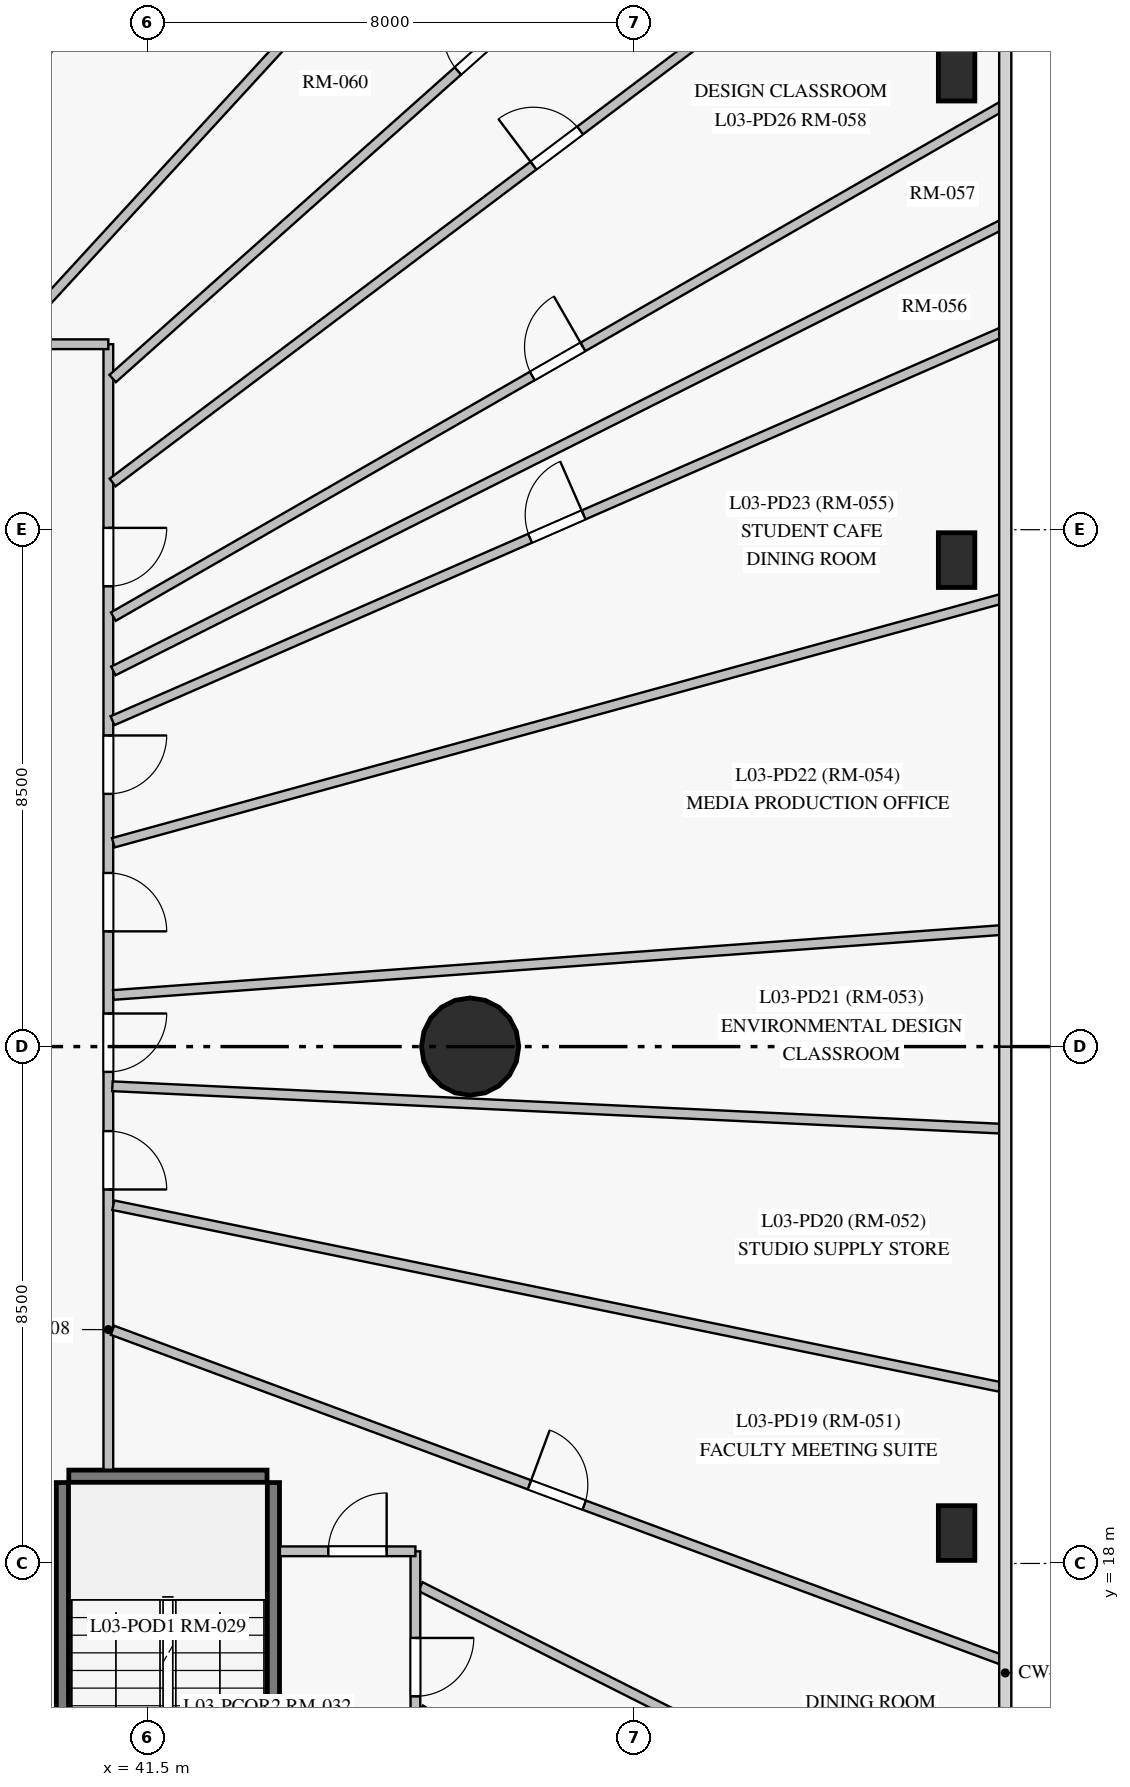
"""IFC4 building model, lengths in metres.
Left out: names, types, materials, properties, quantities, classifications, styles, units other than length and angle.
Written with IfcOpenShell. Run it as: python <this file> out.ifc"""

import sys

from ifc_helpers import new_model, si_unit, direction, frame, frame_2d, origin, origin_with_axes, origin_2d, place, context, subcontext, project, spatial, rectangle, circle, extrude, source, transform, mapped, element, fill, save


model = new_model("IFC4")
c1 = context("Model", 3, precision=1e-05, world=origin(), true_north=direction((0.0, 1.0)))
c2 = subcontext(c1, "Body", "Model", "MODEL_VIEW")
j1 = project(units=[si_unit("LENGTHUNIT", "METRE"), si_unit("PLANEANGLEUNIT", "RADIAN")], contexts=[c1])
p1 = place(None, origin())
s1 = spatial("IfcSite", under=j1, at=p1, CompositionType="ELEMENT")
p2 = place(p1, origin())
s2 = spatial("IfcBuilding", under=s1, at=p2, CompositionType="ELEMENT")
p3 = place(p2, frame((0.0, 0.0, 13.5)))
s3 = spatial("IfcBuildingStorey", under=s2, at=p3, CompositionType="ELEMENT", Elevation=13.5)
m1 = source(origin_with_axes(), c2, "Body", "SweptSolid", [
    extrude(circle(Radius=0.8, at=origin_2d()), origin(), (0.0, 0.0, 1.0), 4.5),
])
p4 = place(p3, frame((46.8, 26.5, 0.0), z_axis=(0.0, 0.0, 1.0), x_axis=(1.0, 0.0, 0.0)))
e1 = element("IfcColumn", 1, at=p4, inside=s3, PredefinedType="COLUMN", context=c2, shape_type="MappedRepresentation", body=[
    mapped(m1, transform((0.0, 0.0, 0.0), scale=1.0)),
])
m2 = source(origin_with_axes(), c2, "Body", "SweptSolid", [
    extrude(rectangle(XDim=0.6, YDim=0.9, at=origin_2d()), origin(), (0.0, 0.0, 1.0), 4.5),
])
for number, where, z_axis, x_axis in (
    (2, (54.8, 18.5, 0.0), (0.0, 0.0, 1.0), (1.0, 0.0, 0.0)),
    (3, (54.8, 34.5, 0.0), (0.0, 0.0, 1.0), (1.0, 0.0, 0.0)),
    (4, (54.8, 42.5, 0.0), (0.0, 0.0, 1.0), (1.0, 0.0, 0.0)),
):
    element("IfcColumn", number, at=place(p3, frame(where, z_axis=z_axis, x_axis=x_axis)), inside=s3, PredefinedType="PILASTER", context=c2, shape_type="MappedRepresentation", body=[
        mapped(m2, transform((0.0, 0.0, 0.0), scale=1.0)),
    ])
p5 = place(p3, frame((40.095, 11.98, 0.0), z_axis=(0.0, 0.0, 1.0), x_axis=(0.0, 1.0, 0.0)))
e5 = element("IfcWall", 5, at=p5, inside=s3, PredefinedType="SHEAR", context=c2, shape_type="SweptSolid", body=[
    extrude(rectangle(XDim=7.35, YDim=0.2, at=frame_2d((3.675, 0.0))), origin(), (0.0, 0.0, 1.0), 4.225),
])
p6 = place(p3, frame((43.565, 11.98, 0.0), z_axis=(0.0, 0.0, 1.0), x_axis=(0.0, 1.0, 0.0)))
e6 = element("IfcWall", 6, at=p6, inside=s3, PredefinedType="SHEAR", context=c2, shape_type="SweptSolid", body=[
    extrude(rectangle(XDim=7.35, YDim=0.2, at=frame_2d((3.675, 0.0))), origin(), (0.0, 0.0, 1.0), 4.225),
])
p7 = place(p6, frame((0.35, 0.0, 0.0)))
e7 = element("IfcOpeningElement", 7, at=p7, cuts=e6, PredefinedType="OPENING", context=c2, shape_type="SweptSolid", body=[
    extrude(rectangle(XDim=1.15, YDim=2.15, at=frame_2d((0.575, 1.075))), frame((0.0, 0.11, 0.0), z_axis=(0.0, -1.0, 0.0), x_axis=(1.0, 0.0, 0.0)), (0.0, 0.0, 1.0), 0.22),
])
p8 = place(p3, frame((40.2, 19.435, 0.0), z_axis=(0.0, 0.0, 1.0), x_axis=(1.0, 0.0, 0.0)))
e8 = element("IfcWall", 8, at=p8, inside=s3, PredefinedType="SHEAR", context=c2, shape_type="SweptSolid", body=[
    extrude(rectangle(XDim=3.26, YDim=0.2, at=frame_2d((1.63, 0.0))), origin(), (0.0, 0.0, 1.0), 4.225),
])
p9 = place(p3, frame((40.85, 38.05, 0.0), z_axis=(0.0, 0.0, 1.0), x_axis=(0.0, -1.0, 0.0)))
e9 = element("IfcWall", 9, at=p9, inside=s3, PredefinedType="PARTITIONING", context=c2, shape_type="SweptSolid", body=[
    extrude(rectangle(XDim=18.508, YDim=0.16, at=frame_2d((9.254, 0.0))), origin(), (0.0, 0.0, 1.0), 3.275),
])
p10 = place(p9, frame((12.94, 0.0, 0.0)))
e10 = element("IfcOpeningElement", 10, at=p10, cuts=e9, PredefinedType="OPENING", context=c2, shape_type="SweptSolid", body=[
    extrude(rectangle(XDim=0.96, YDim=2.15, at=frame_2d((0.48, 1.075))), frame((0.0, 0.09, 0.0), z_axis=(0.0, -1.0, 0.0), x_axis=(1.0, 0.0, 0.0)), (0.0, 0.0, 1.0), 0.18),
])
p11 = place(p9, frame((11.006, 0.0, 0.0)))
e11 = element("IfcOpeningElement", 11, at=p11, cuts=e9, PredefinedType="OPENING", context=c2, shape_type="SweptSolid", body=[
    extrude(rectangle(XDim=0.96, YDim=2.15, at=frame_2d((0.48, 1.075))), frame((0.0, 0.09, 0.0), z_axis=(0.0, -1.0, 0.0), x_axis=(1.0, 0.0, 0.0)), (0.0, 0.0, 1.0), 0.18),
])
p12 = place(p9, frame((8.695, 0.0, 0.0)))
e12 = element("IfcOpeningElement", 12, at=p12, cuts=e9, PredefinedType="OPENING", context=c2, shape_type="SweptSolid", body=[
    extrude(rectangle(XDim=0.96, YDim=2.15, at=frame_2d((0.48, 1.075))), frame((0.0, 0.09, 0.0), z_axis=(0.0, -1.0, 0.0), x_axis=(1.0, 0.0, 0.0)), (0.0, 0.0, 1.0), 0.18),
])
p13 = place(p9, frame((6.434, 0.0, 0.0)))
e13 = element("IfcOpeningElement", 13, at=p13, cuts=e9, PredefinedType="OPENING", context=c2, shape_type="SweptSolid", body=[
    extrude(rectangle(XDim=0.96, YDim=2.15, at=frame_2d((0.48, 1.075))), frame((0.0, 0.09, 0.0), z_axis=(0.0, -1.0, 0.0), x_axis=(1.0, 0.0, 0.0)), (0.0, 0.0, 1.0), 0.18),
])
p14 = place(p9, frame((3.02, 0.0, 0.0)))
e14 = element("IfcOpeningElement", 14, at=p14, cuts=e9, PredefinedType="OPENING", context=c2, shape_type="SweptSolid", body=[
    extrude(rectangle(XDim=0.96, YDim=2.15, at=frame_2d((0.48, 1.075))), frame((0.0, 0.09, 0.0), z_axis=(0.0, -1.0, 0.0), x_axis=(1.0, 0.0, 0.0)), (0.0, 0.0, 1.0), 0.18),
])
p15 = place(p3, frame((40.92, 35.776, 0.0), z_axis=(0.0, 0.0, 1.0), x_axis=(0.798876492125, 0.601495095848, 0.0)))
e15 = element("IfcWall", 15, at=p15, inside=s3, PredefinedType="PARTITIONING", context=c2, shape_type="SweptSolid", body=[
    extrude(rectangle(XDim=18.328, YDim=0.16, at=frame_2d((9.164, 0.0))), origin(), (0.0, 0.0, 1.0), 4.225),
])
p16 = place(p15, frame((8.664, 0.0, 0.0)))
e16 = element("IfcOpeningElement", 16, at=p16, cuts=e15, PredefinedType="OPENING", context=c2, shape_type="SweptSolid", body=[
    extrude(rectangle(XDim=0.96, YDim=2.15, at=frame_2d((0.48, 1.075))), frame((0.0, 0.09, 0.0), z_axis=(0.0, -1.0, 0.0), x_axis=(1.0, 0.0, 0.0)), (0.0, 0.0, 1.0), 0.18),
])
p17 = place(p3, frame((40.932, 33.571, 0.0), z_axis=(0.0, 0.0, 1.0), x_axis=(0.867157652111, 0.498033740207, 0.0)))
e17 = element("IfcWall", 17, at=p17, inside=s3, PredefinedType="PARTITIONING", context=c2, shape_type="SweptSolid", body=[
    extrude(rectangle(XDim=16.876, YDim=0.16, at=frame_2d((8.438, 0.0))), origin(), (0.0, 0.0, 1.0), 4.225),
])
p18 = place(p17, frame((7.946, 0.0, 0.0)))
e18 = element("IfcOpeningElement", 18, at=p18, cuts=e17, PredefinedType="OPENING", context=c2, shape_type="SweptSolid", body=[
    extrude(rectangle(XDim=0.96, YDim=2.15, at=frame_2d((0.48, 1.075))), frame((0.0, 0.09, 0.0), z_axis=(0.0, -1.0, 0.0), x_axis=(1.0, 0.0, 0.0)), (0.0, 0.0, 1.0), 0.18),
])
p19 = place(p3, frame((40.921, 37.485, 0.0), z_axis=(0.0, 0.0, 1.0), x_axis=(0.746657873384, 0.665208253191, 0.0)))
e19 = element("IfcWall", 19, at=p19, inside=s3, PredefinedType="PARTITIONING", context=c2, shape_type="SweptSolid", body=[
    extrude(rectangle(XDim=16.789, YDim=0.16, at=frame_2d((8.394, 0.0))), origin(), (0.0, 0.0, 1.0), 4.225),
])
p20 = place(p19, frame((7.604, 0.0, 0.0)))
e20 = element("IfcOpeningElement", 20, at=p20, cuts=e19, PredefinedType="OPENING", context=c2, shape_type="SweptSolid", body=[
    extrude(rectangle(XDim=0.96, YDim=2.15, at=frame_2d((0.48, 1.075))), frame((0.0, 0.09, 0.0), z_axis=(0.0, -1.0, 0.0), x_axis=(1.0, 0.0, 0.0)), (0.0, 0.0, 1.0), 0.18),
])
p21 = place(p3, frame((40.932, 32.677, 0.0), z_axis=(0.0, 0.0, 1.0), x_axis=(0.893608855562, 0.448846536425, 0.0)))
e21 = element("IfcWall", 21, at=p21, inside=s3, PredefinedType="PARTITIONING", context=c2, shape_type="SweptSolid", body=[
    extrude(rectangle(XDim=16.379, YDim=0.16, at=frame_2d((8.189, 0.0))), origin(), (0.0, 0.0, 1.0), 4.225),
])
p22 = place(p3, frame((40.918, 31.859, 0.0), z_axis=(0.0, 0.0, 1.0), x_axis=(0.91638288518, 0.400302895004, 0.0)))
e22 = element("IfcWall", 22, at=p22, inside=s3, PredefinedType="PARTITIONING", context=c2, shape_type="SweptSolid", body=[
    extrude(rectangle(XDim=15.988, YDim=0.16, at=frame_2d((7.994, 0.0))), origin(), (0.0, 0.0, 1.0), 4.225),
])
p23 = place(p22, frame((7.494, 0.0, 0.0)))
e23 = element("IfcOpeningElement", 23, at=p23, cuts=e22, PredefinedType="OPENING", context=c2, shape_type="SweptSolid", body=[
    extrude(rectangle(XDim=0.96, YDim=2.15, at=frame_2d((0.48, 1.075))), frame((0.0, 0.09, 0.0), z_axis=(0.0, -1.0, 0.0), x_axis=(1.0, 0.0, 0.0)), (0.0, 0.0, 1.0), 0.18),
])
p24 = place(p3, frame((40.918, 21.834, 0.0), z_axis=(0.0, 0.0, 1.0), x_axis=(0.937689005533, -0.347475652244, 0.0)))
e24 = element("IfcWall", 24, at=p24, inside=s3, PredefinedType="PARTITIONING", context=c2, shape_type="SweptSolid", body=[
    extrude(rectangle(XDim=15.627, YDim=0.16, at=frame_2d((7.813, 0.0))), origin(), (0.0, 0.0, 1.0), 4.225),
])
p25 = place(p24, frame((7.313, 0.0, 0.0)))
e25 = element("IfcOpeningElement", 25, at=p25, cuts=e24, PredefinedType="OPENING", context=c2, shape_type="SweptSolid", body=[
    extrude(rectangle(XDim=0.96, YDim=2.15, at=frame_2d((0.48, 1.075))), frame((0.0, 0.09, 0.0), z_axis=(0.0, -1.0, 0.0), x_axis=(1.0, 0.0, 0.0)), (0.0, 0.0, 1.0), 0.18),
])
p26 = place(p3, frame((25.4, 38.05, 0.0), z_axis=(0.0, 0.0, 1.0), x_axis=(1.0, 0.0, 0.0)))
e26 = element("IfcWall", 26, at=p26, inside=s3, PredefinedType="PARTITIONING", context=c2, shape_type="SweptSolid", body=[
    extrude(rectangle(XDim=15.45, YDim=0.16, at=frame_2d((7.725, 0.0))), origin(), (0.0, 0.0, 1.0), 4.225),
])
p27 = place(p26, frame((11.752, 0.0, 0.0)))
e27 = element("IfcOpeningElement", 27, at=p27, cuts=e26, PredefinedType="OPENING", context=c2, shape_type="SweptSolid", body=[
    extrude(rectangle(XDim=0.96, YDim=2.15, at=frame_2d((0.48, 1.075))), frame((0.0, 0.09, 0.0), z_axis=(0.0, -1.0, 0.0), x_axis=(1.0, 0.0, 0.0)), (0.0, 0.0, 1.0), 0.18),
])
p28 = place(p26, frame((9.567, 0.0, 0.0)))
e28 = element("IfcOpeningElement", 28, at=p28, cuts=e26, PredefinedType="OPENING", context=c2, shape_type="SweptSolid", body=[
    extrude(rectangle(XDim=0.96, YDim=2.15, at=frame_2d((0.48, 1.075))), frame((0.0, 0.09, 0.0), z_axis=(0.0, -1.0, 0.0), x_axis=(1.0, 0.0, 0.0)), (0.0, 0.0, 1.0), 0.18),
])
p29 = place(p26, frame((7.25, 0.0, 0.0)))
e29 = element("IfcOpeningElement", 29, at=p29, cuts=e26, PredefinedType="OPENING", context=c2, shape_type="SweptSolid", body=[
    extrude(rectangle(XDim=0.96, YDim=2.15, at=frame_2d((0.48, 1.075))), frame((0.0, 0.09, 0.0), z_axis=(0.0, -1.0, 0.0), x_axis=(1.0, 0.0, 0.0)), (0.0, 0.0, 1.0), 0.18),
])
p30 = place(p26, frame((4.933, 0.0, 0.0)))
e30 = element("IfcOpeningElement", 30, at=p30, cuts=e26, PredefinedType="OPENING", context=c2, shape_type="SweptSolid", body=[
    extrude(rectangle(XDim=0.96, YDim=2.15, at=frame_2d((0.48, 1.075))), frame((0.0, 0.09, 0.0), z_axis=(0.0, -1.0, 0.0), x_axis=(1.0, 0.0, 0.0)), (0.0, 0.0, 1.0), 0.18),
])
p31 = place(p3, frame((40.932, 29.852, 0.0), z_axis=(0.0, 0.0, 1.0), x_axis=(0.964293624469, 0.264835431556, 0.0)))
e31 = element("IfcWall", 31, at=p31, inside=s3, PredefinedType="PARTITIONING", context=c2, shape_type="SweptSolid", body=[
    extrude(rectangle(XDim=15.183, YDim=0.16, at=frame_2d((7.592, 0.0))), origin(), (0.0, 0.0, 1.0), 3.725),
])
p32 = place(p3, frame((40.932, 23.891, 0.0), z_axis=(0.0, 0.0, 1.0), x_axis=(0.979644974136, -0.200737950197, 0.0)))
e32 = element("IfcWall", 32, at=p32, inside=s3, PredefinedType="PARTITIONING", context=c2, shape_type="SweptSolid", body=[
    extrude(rectangle(XDim=14.946, YDim=0.16, at=frame_2d((7.473, 0.0))), origin(), (0.0, 0.0, 1.0), 3.725),
])
p33 = place(p3, frame((40.932, 27.349, 0.0), z_axis=(0.0, 0.0, 1.0), x_axis=(0.997339240678, 0.072900198928, 0.0)))
e33 = element("IfcWall", 33, at=p33, inside=s3, PredefinedType="PARTITIONING", context=c2, shape_type="SweptSolid", body=[
    extrude(rectangle(XDim=14.682, YDim=0.16, at=frame_2d((7.341, 0.0))), origin(), (0.0, 0.0, 1.0), 3.725),
])
p34 = place(p3, frame((40.917, 25.847, 0.0), z_axis=(0.0, 0.0, 1.0), x_axis=(0.998863390111, -0.047664744794, 0.0)))
e34 = element("IfcWall", 34, at=p34, inside=s3, PredefinedType="PARTITIONING", context=c2, shape_type="SweptSolid", body=[
    extrude(rectangle(XDim=14.675, YDim=0.16, at=frame_2d((7.337, 0.0))), origin(), (0.0, 0.0, 1.0), 3.275),
])
p35 = place(p3, frame((36.564, 38.12, 0.0), z_axis=(0.0, 0.0, 1.0), x_axis=(0.566648651746, 0.823959529027, 0.0)))
e35 = element("IfcWall", 35, at=p35, inside=s3, PredefinedType="PARTITIONING", context=c2, shape_type="SweptSolid", body=[
    extrude(rectangle(XDim=12.797, YDim=0.16, at=frame_2d((6.398, 0.0))), origin(), (0.0, 0.0, 1.0), 4.225),
])
p36 = place(p3, frame((45.982, 15.595, 0.0), z_axis=(0.0, 0.0, 1.0), x_axis=(0.849998298484, -0.526785433145, 0.0)))
e36 = element("IfcWall", 36, at=p36, inside=s3, PredefinedType="PARTITIONING", context=c2, shape_type="SweptSolid", body=[
    extrude(rectangle(XDim=11.274, YDim=0.16, at=frame_2d((5.637, 0.0))), origin(), (0.0, 0.0, 1.0), 4.225),
])
p37 = place(p3, frame((45.982, 17.621, 0.0), z_axis=(0.0, 0.0, 1.0), x_axis=(0.892971532671, -0.450113143375, 0.0)))
e37 = element("IfcWall", 37, at=p37, inside=s3, PredefinedType="PARTITIONING", context=c2, shape_type="SweptSolid", body=[
    extrude(rectangle(XDim=10.735, YDim=0.16, at=frame_2d((5.368, 0.0))), origin(), (0.0, 0.0, 1.0), 4.225),
])
p38 = place(p3, frame((39.25, 38.121, 0.0), z_axis=(0.0, 0.0, 1.0), x_axis=(0.676243830609, 0.736677868246, 0.0)))
e38 = element("IfcWall", 38, at=p38, inside=s3, PredefinedType="PARTITIONING", context=c2, shape_type="SweptSolid", body=[
    extrude(rectangle(XDim=9.728, YDim=0.16, at=frame_2d((4.864, 0.0))), origin(), (0.0, 0.0, 1.0), 3.275),
])
p39 = place(p3, frame((45.9, 18.2, 0.0), z_axis=(0.0, 0.0, 1.0), x_axis=(0.0, -1.0, 0.0)))
e39 = element("IfcWall", 39, at=p39, inside=s3, PredefinedType="PARTITIONING", context=c2, shape_type="SweptSolid", body=[
    extrude(rectangle(XDim=6.4, YDim=0.16, at=frame_2d((3.2, 0.0))), origin(), (0.0, 0.0, 1.0), 4.225),
])
p40 = place(p39, frame((3.115, 0.0, 0.0)))
e40 = element("IfcOpeningElement", 40, at=p40, cuts=e39, PredefinedType="OPENING", context=c2, shape_type="SweptSolid", body=[
    extrude(rectangle(XDim=0.96, YDim=2.15, at=frame_2d((0.48, 1.075))), frame((0.0, 0.09, 0.0), z_axis=(0.0, -1.0, 0.0), x_axis=(1.0, 0.0, 0.0)), (0.0, 0.0, 1.0), 0.18),
])
p41 = place(p39, frame((1.425, 0.0, 0.0)))
e41 = element("IfcOpeningElement", 41, at=p41, cuts=e39, PredefinedType="OPENING", context=c2, shape_type="SweptSolid", body=[
    extrude(rectangle(XDim=0.96, YDim=2.15, at=frame_2d((0.48, 1.075))), frame((0.0, 0.09, 0.0), z_axis=(0.0, -1.0, 0.0), x_axis=(1.0, 0.0, 0.0)), (0.0, 0.0, 1.0), 0.18),
])
p42 = place(p3, frame((43.672, 18.2, 0.0), z_axis=(0.0, 0.0, 1.0), x_axis=(1.0, 0.0, 0.0)))
e42 = element("IfcWall", 42, at=p42, inside=s3, PredefinedType="PARTITIONING", context=c2, shape_type="SweptSolid", body=[
    extrude(rectangle(XDim=2.228, YDim=0.16, at=frame_2d((1.114, 0.0))), origin(), (0.0, 0.0, 1.0), 4.225),
])
p43 = place(p42, frame((0.795, 0.0, 0.0)))
e43 = element("IfcOpeningElement", 43, at=p43, cuts=e42, PredefinedType="OPENING", context=c2, shape_type="SweptSolid", body=[
    extrude(rectangle(XDim=0.96, YDim=2.15, at=frame_2d((0.48, 1.075))), frame((0.0, 0.09, 0.0), z_axis=(0.0, -1.0, 0.0), x_axis=(1.0, 0.0, 0.0)), (0.0, 0.0, 1.0), 0.18),
])
m3 = source(origin_with_axes(), c2, "Body", "SweptSolid", [
    extrude(rectangle(XDim=0.96, YDim=2.15, at=frame_2d((0.48, 1.075))), frame((0.0, 0.025, 0.0), z_axis=(0.0, -1.0, 0.0), x_axis=(1.0, 0.0, 0.0)), (0.0, 0.0, 1.0), 0.05),
])
p44 = place(p41, origin())
e44 = element("IfcDoor", 44, at=p44, inside=s3, OperationType="SINGLE_SWING_LEFT", PredefinedType="DOOR", context=c2, shape_type="MappedRepresentation", body=[
    mapped(m3, transform((0.0, 0.0, 0.0), scale=1.0)),
])
fill(e41, e44)
p45 = place(p43, origin())
e45 = element("IfcDoor", 45, at=p45, inside=s3, OperationType="SINGLE_SWING_RIGHT", PredefinedType="DOOR", context=c2, shape_type="MappedRepresentation", body=[
    mapped(m3, transform((0.0, 0.0, 0.0), scale=1.0)),
])
fill(e43, e45)
p46 = place(p25, origin())
e46 = element("IfcDoor", 46, at=p46, inside=s3, OperationType="SINGLE_SWING_LEFT", PredefinedType="DOOR", context=c2, shape_type="MappedRepresentation", body=[
    mapped(m3, transform((0.0, 0.0, 0.0), scale=1.0)),
])
fill(e25, e46)
p47 = place(p10, origin())
e47 = element("IfcDoor", 47, at=p47, inside=s3, OperationType="SINGLE_SWING_RIGHT", PredefinedType="DOOR", context=c2, shape_type="MappedRepresentation", body=[
    mapped(m3, transform((0.0, 0.0, 0.0), scale=1.0)),
])
fill(e10, e47)
p48 = place(p11, origin())
e48 = element("IfcDoor", 48, at=p48, inside=s3, OperationType="SINGLE_SWING_LEFT", PredefinedType="DOOR", context=c2, shape_type="MappedRepresentation", body=[
    mapped(m3, transform((0.0, 0.0, 0.0), scale=1.0)),
])
fill(e11, e48)
p49 = place(p12, origin())
e49 = element("IfcDoor", 49, at=p49, inside=s3, OperationType="SINGLE_SWING_RIGHT", PredefinedType="DOOR", context=c2, shape_type="MappedRepresentation", body=[
    mapped(m3, transform((0.0, 0.0, 0.0), scale=1.0)),
])
fill(e12, e49)
p50 = place(p13, origin())
e50 = element("IfcDoor", 50, at=p50, inside=s3, OperationType="SINGLE_SWING_LEFT", PredefinedType="DOOR", context=c2, shape_type="MappedRepresentation", body=[
    mapped(m3, transform((0.0, 0.0, 0.0), scale=1.0)),
])
fill(e13, e50)
p51 = place(p23, origin())
e51 = element("IfcDoor", 51, at=p51, inside=s3, OperationType="SINGLE_SWING_RIGHT", PredefinedType="DOOR", context=c2, shape_type="MappedRepresentation", body=[
    mapped(m3, transform((0.0, 0.0, 0.0), scale=1.0)),
])
fill(e23, e51)
p52 = place(p14, origin())
e52 = element("IfcDoor", 52, at=p52, inside=s3, OperationType="SINGLE_SWING_LEFT", PredefinedType="DOOR", context=c2, shape_type="MappedRepresentation", body=[
    mapped(m3, transform((0.0, 0.0, 0.0), scale=1.0)),
])
fill(e14, e52)
p53 = place(p18, origin())
e53 = element("IfcDoor", 53, at=p53, inside=s3, OperationType="SINGLE_SWING_RIGHT", PredefinedType="DOOR", context=c2, shape_type="MappedRepresentation", body=[
    mapped(m3, transform((0.0, 0.0, 0.0), scale=1.0)),
])
fill(e18, e53)
p54 = place(p16, origin())
e54 = element("IfcDoor", 54, at=p54, inside=s3, OperationType="SINGLE_SWING_LEFT", PredefinedType="DOOR", context=c2, shape_type="MappedRepresentation", body=[
    mapped(m3, transform((0.0, 0.0, 0.0), scale=1.0)),
])
fill(e16, e54)
p55 = place(p20, origin())
e55 = element("IfcDoor", 55, at=p55, inside=s3, OperationType="SINGLE_SWING_RIGHT", PredefinedType="DOOR", context=c2, shape_type="MappedRepresentation", body=[
    mapped(m3, transform((0.0, 0.0, 0.0), scale=1.0)),
])
fill(e20, e55)
save(model, sys.argv[1])
